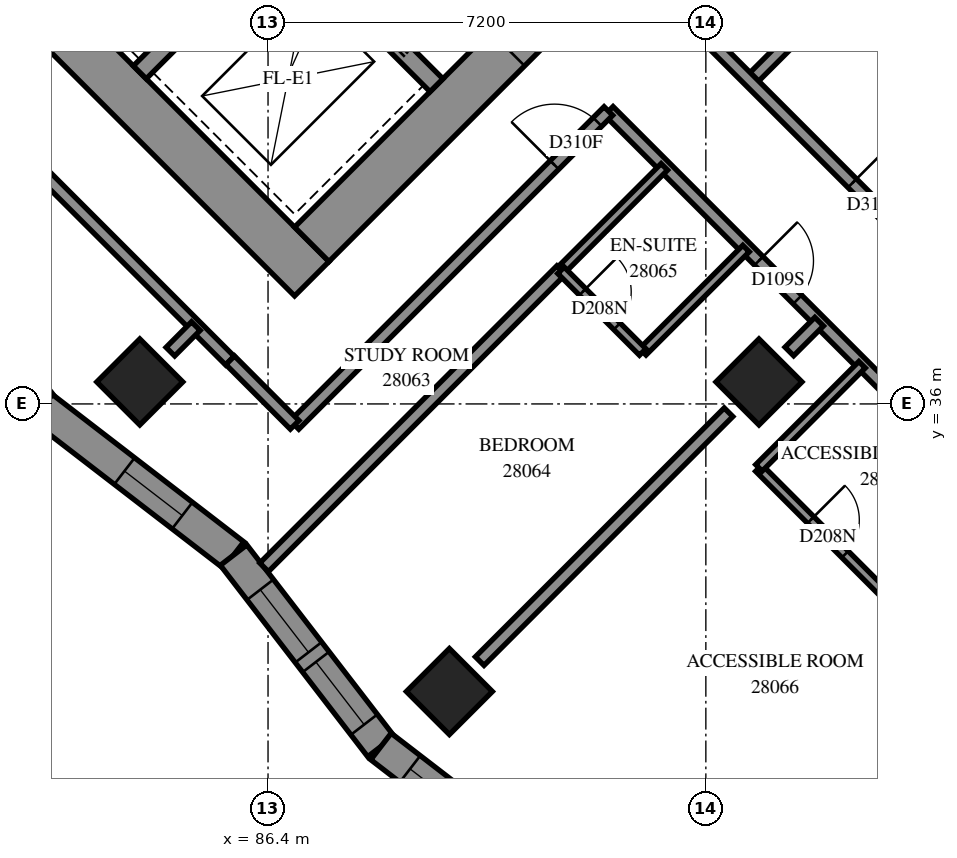
"""IFC4 building model, lengths in metres.
Left out: names, types, materials, properties, quantities, classifications, styles, units other than length and angle.
Written with IfcOpenShell. Run it as: python <this file> out.ifc"""

import sys

from ifc_helpers import new_model, si_unit, direction, frame, frame_2d, origin, origin_2d, place, context, subcontext, project, spatial, polyline, rectangle, outline, extrude, element, fill, save


model = new_model("IFC4")
c1 = context("Model", 3, precision=1e-05, world=origin(), true_north=direction((0.0, 1.0)))
c2 = subcontext(c1, "Body", "Model", "MODEL_VIEW")
j1 = project(units=[si_unit("LENGTHUNIT", "METRE"), si_unit("PLANEANGLEUNIT", "RADIAN")], contexts=[c1])
p1 = place(None, origin())
s1 = spatial("IfcSite", under=j1, at=p1, CompositionType="ELEMENT")
p2 = place(p1, origin())
s2 = spatial("IfcBuilding", under=s1, at=p2, CompositionType="ELEMENT")
p3 = place(p2, frame((0.0, 0.0, 105.0)))
s3 = spatial("IfcBuildingStorey", under=s2, at=p3, CompositionType="ELEMENT", Elevation=105.0)
for number, where, z_axis, x_axis in (
    (1, (84.291, 36.362, 0.0), (0.0, 0.0, 1.0), (0.707, -0.707, 0.0)),
    (2, (94.474, 36.362, 0.0), (0.0, 0.0, 1.0), (0.707, -0.707, 0.0)),
    (3, (89.382, 31.271, 0.0), (0.0, 0.0, 1.0), (0.707, -0.707, 0.0)),
):
    element("IfcColumn", number, at=place(p3, frame(where, z_axis=z_axis, x_axis=x_axis)), inside=s3, PredefinedType="COLUMN", context=c2, shape_type="SweptSolid", body=[
        extrude(rectangle(XDim=1.0, YDim=1.0, at=origin_2d()), origin(), (0.0, 0.0, 1.0), 3.1),
    ])
p4 = place(p3, frame((75.806, 49.373, -0.3), z_axis=(0.0, 0.0, 1.0), x_axis=(0.7071067812, -0.7071067812, 0.0)))
e4 = element("IfcWall", 4, at=p4, inside=s3, PredefinedType="SHEAR", context=c2, shape_type="SweptSolid", body=[
    extrude(rectangle(XDim=16.0, YDim=0.8, at=frame_2d((8.0, 0.0))), origin(), (0.0, 0.0, 1.0), 2.7),
])
p5 = place(p3, frame((87.12, 38.625, -0.3), z_axis=(0.0, 0.0, 1.0), x_axis=(0.7071067812, 0.7071067812, 0.0)))
e5 = element("IfcWall", 5, at=p5, inside=s3, PredefinedType="SHEAR", context=c2, shape_type="SweptSolid", body=[
    extrude(rectangle(XDim=14.4, YDim=0.8, at=frame_2d((7.2, 0.0))), origin(), (0.0, 0.0, 1.0), 2.7),
])
p6 = place(p5, frame((4.55, 0.0, 0.3)))
e6 = element("IfcOpeningElement", 6, at=p6, cuts=e5, PredefinedType="OPENING", context=c2, shape_type="SweptSolid", body=[
    extrude(rectangle(XDim=1.1, YDim=2.1, at=frame_2d((0.55, 1.05))), frame((0.0, 0.41, 0.0), z_axis=(0.0, -1.0, 0.0), x_axis=(1.0, 0.0, 0.0)), (0.0, 0.0, 1.0), 0.82),
])
p7 = place(p5, frame((11.35, 0.0, 0.3)))
e7 = element("IfcOpeningElement", 7, at=p7, cuts=e5, PredefinedType="OPENING", context=c2, shape_type="SweptSolid", body=[
    extrude(rectangle(XDim=1.1, YDim=2.1, at=frame_2d((0.55, 1.05))), frame((0.0, 0.41, 0.0), z_axis=(0.0, -1.0, 0.0), x_axis=(1.0, 0.0, 0.0)), (0.0, 0.0, 1.0), 0.82),
])
p8 = place(p3, frame((84.291, 41.453, 0.0), z_axis=(0.0, 0.0, 1.0), x_axis=(0.7071067812, 0.7071067812, 0.0)))
e8 = element("IfcWall", 8, at=p8, inside=s3, PredefinedType="SOLIDWALL", context=c2, shape_type="SweptSolid", body=[
    extrude(rectangle(XDim=3.3, YDim=0.3, at=frame_2d((1.65, 0.0))), origin(), (0.0, 0.0, 1.0), 3.1),
])
p9 = place(p3, frame((78.988, 51.423, 0.0), z_axis=(0.0, 0.0, 1.0), x_axis=(0.7071067812, -0.7071067812, 0.0)))
e9 = element("IfcWall", 9, at=p9, inside=s3, PredefinedType="SOLIDWALL", context=c2, shape_type="SweptSolid", body=[
    extrude(rectangle(XDim=14.4, YDim=0.3, at=frame_2d((7.2, 0.0))), origin(), (0.0, 0.0, 1.0), 3.1),
])
p10 = place(p9, frame((1.25, 0.0, 0.0)))
e10 = element("IfcOpeningElement", 10, at=p10, cuts=e9, PredefinedType="OPENING", context=c2, shape_type="SweptSolid", body=[
    extrude(rectangle(XDim=1.1, YDim=2.1, at=frame_2d((0.55, 1.05))), frame((0.0, 0.16, 0.0), z_axis=(0.0, -1.0, 0.0), x_axis=(1.0, 0.0, 0.0)), (0.0, 0.0, 1.0), 0.32),
])
p11 = place(p9, frame((4.85, 0.0, 0.0)))
e11 = element("IfcOpeningElement", 11, at=p11, cuts=e9, PredefinedType="OPENING", context=c2, shape_type="SweptSolid", body=[
    extrude(rectangle(XDim=1.1, YDim=2.1, at=frame_2d((0.55, 1.05))), frame((0.0, 0.16, 0.0), z_axis=(0.0, -1.0, 0.0), x_axis=(1.0, 0.0, 0.0)), (0.0, 0.0, 1.0), 0.32),
])
p12 = place(p9, frame((8.45, 0.0, 0.0)))
e12 = element("IfcOpeningElement", 12, at=p12, cuts=e9, PredefinedType="OPENING", context=c2, shape_type="SweptSolid", body=[
    extrude(rectangle(XDim=1.1, YDim=2.1, at=frame_2d((0.55, 1.05))), frame((0.0, 0.16, 0.0), z_axis=(0.0, -1.0, 0.0), x_axis=(1.0, 0.0, 0.0)), (0.0, 0.0, 1.0), 0.32),
])
p13 = place(p9, frame((12.05, 0.0, 0.0)))
e13 = element("IfcOpeningElement", 13, at=p13, cuts=e9, PredefinedType="OPENING", context=c2, shape_type="SweptSolid", body=[
    extrude(rectangle(XDim=1.1, YDim=2.1, at=frame_2d((0.55, 1.05))), frame((0.0, 0.16, 0.0), z_axis=(0.0, -1.0, 0.0), x_axis=(1.0, 0.0, 0.0)), (0.0, 0.0, 1.0), 0.32),
])
p14 = place(p3, frame((80.251, 39.101, 0.0), z_axis=(0.0, 0.0, 1.0), x_axis=(0.6100580662, -0.79235671, 0.0)))
e14 = element("IfcWall", 14, at=p14, inside=s3, PredefinedType="SOLIDWALL", context=c2, shape_type="SweptSolid", body=[
    extrude(outline(polyline([(0.056, -0.275), (4.029, -0.275), (3.957, 0.275), (-0.056, 0.275), (0.056, -0.275)])), origin(), (0.0, 0.0, 1.0), 3.1),
])
p15 = place(p14, frame((1.881, 0.0, 0.5)))
e15 = element("IfcOpeningElement", 15, at=p15, cuts=e14, PredefinedType="OPENING", context=c2, shape_type="SweptSolid", body=[
    extrude(rectangle(XDim=1.2, YDim=2.45, at=frame_2d((0.6, 1.225))), frame((0.0, 0.285, 0.0), z_axis=(0.0, -1.0, 0.0), x_axis=(1.0, 0.0, 0.0)), (0.0, 0.0, 1.0), 0.57),
])
p16 = place(p3, frame((82.686, 35.938, 0.0), z_axis=(0.0, 0.0, 1.0), x_axis=(0.7923534452, -0.6100623066, 0.0)))
e16 = element("IfcWall", 16, at=p16, inside=s3, PredefinedType="SOLIDWALL", context=c2, shape_type="SweptSolid", body=[
    extrude(outline(polyline([(-0.036, -0.275), (3.937, -0.275), (4.008, 0.275), (0.036, 0.275), (-0.036, -0.275)])), origin(), (0.0, 0.0, 1.0), 3.1),
])
p17 = place(p16, frame((1.707, 0.0, 0.5)))
e17 = element("IfcOpeningElement", 17, at=p17, cuts=e16, PredefinedType="OPENING", context=c2, shape_type="SweptSolid", body=[
    extrude(rectangle(XDim=1.2, YDim=2.45, at=frame_2d((0.6, 1.225))), frame((0.0, 0.285, 0.0), z_axis=(0.0, -1.0, 0.0), x_axis=(1.0, 0.0, 0.0)), (0.0, 0.0, 1.0), 0.57),
])
p18 = place(p3, frame((85.834, 33.514, 0.0), z_axis=(0.0, 0.0, 1.0), x_axis=(0.6100781116, -0.7923412761, 0.0)))
e18 = element("IfcWall", 18, at=p18, inside=s3, PredefinedType="SOLIDWALL", context=c2, shape_type="SweptSolid", body=[
    extrude(outline(polyline([(0.036, -0.275), (4.008, -0.275), (3.937, 0.275), (-0.036, 0.275), (0.036, -0.275)])), origin(), (0.0, 0.0, 1.0), 3.1),
])
p19 = place(p18, frame((0.718, 0.0, 0.5)))
e19 = element("IfcOpeningElement", 19, at=p19, cuts=e18, PredefinedType="OPENING", context=c2, shape_type="SweptSolid", body=[
    extrude(rectangle(XDim=1.3, YDim=2.45, at=frame_2d((0.65, 1.225))), frame((0.0, 0.285, 0.0), z_axis=(0.0, -1.0, 0.0), x_axis=(1.0, 0.0, 0.0)), (0.0, 0.0, 1.0), 0.57),
])
p20 = place(p18, frame((2.218, 0.0, 0.5)))
e20 = element("IfcOpeningElement", 20, at=p20, cuts=e18, PredefinedType="OPENING", context=c2, shape_type="SweptSolid", body=[
    extrude(rectangle(XDim=1.3, YDim=2.45, at=frame_2d((0.65, 1.225))), frame((0.0, 0.285, 0.0), z_axis=(0.0, -1.0, 0.0), x_axis=(1.0, 0.0, 0.0)), (0.0, 0.0, 1.0), 0.57),
])
p21 = place(p3, frame((88.257, 30.367, 0.0), z_axis=(0.0, 0.0, 1.0), x_axis=(0.7923412761, -0.6100781116, 0.0)))
e21 = element("IfcWall", 21, at=p21, inside=s3, PredefinedType="SOLIDWALL", context=c2, shape_type="SweptSolid", body=[
    extrude(outline(polyline([(-0.036, -0.275), (3.937, -0.275), (4.008, 0.275), (0.036, 0.275), (-0.036, -0.275)])), origin(), (0.0, 0.0, 1.0), 3.1),
])
p22 = place(p21, frame((0.604, 0.0, 0.5)))
e22 = element("IfcOpeningElement", 22, at=p22, cuts=e21, PredefinedType="OPENING", context=c2, shape_type="SweptSolid", body=[
    extrude(rectangle(XDim=1.3, YDim=2.45, at=frame_2d((0.65, 1.225))), frame((0.0, 0.285, 0.0), z_axis=(0.0, -1.0, 0.0), x_axis=(1.0, 0.0, 0.0)), (0.0, 0.0, 1.0), 0.57),
])
p23 = place(p21, frame((2.104, 0.0, 0.5)))
e23 = element("IfcOpeningElement", 23, at=p23, cuts=e21, PredefinedType="OPENING", context=c2, shape_type="SweptSolid", body=[
    extrude(rectangle(XDim=1.3, YDim=2.45, at=frame_2d((0.65, 1.225))), frame((0.0, 0.285, 0.0), z_axis=(0.0, -1.0, 0.0), x_axis=(1.0, 0.0, 0.0)), (0.0, 0.0, 1.0), 0.57),
])
p24 = place(p3, frame((92.004, 40.819, 0.0), z_axis=(0.0, 0.0, 1.0), x_axis=(0.7071067812, -0.7071067812, 0.0)))
e24 = element("IfcWall", 24, at=p24, inside=s3, PredefinedType="PARTITIONING", context=c2, shape_type="SweptSolid", body=[
    extrude(rectangle(XDim=19.298, YDim=0.2, at=frame_2d((9.649, 0.0))), origin(), (0.0, 0.0, 1.0), 3.1),
])
p25 = place(p24, frame((3.489, 0.0, 0.0)))
e25 = element("IfcOpeningElement", 25, at=p25, cuts=e24, PredefinedType="OPENING", context=c2, shape_type="SweptSolid", body=[
    extrude(rectangle(XDim=0.9, YDim=2.1, at=frame_2d((0.45, 1.05))), frame((0.0, 0.11, 0.0), z_axis=(0.0, -1.0, 0.0), x_axis=(1.0, 0.0, 0.0)), (0.0, 0.0, 1.0), 0.22),
])
p26 = place(p24, frame((9.319, 0.0, 0.0)))
e26 = element("IfcOpeningElement", 26, at=p26, cuts=e24, PredefinedType="OPENING", context=c2, shape_type="SweptSolid", body=[
    extrude(rectangle(XDim=0.9, YDim=2.1, at=frame_2d((0.45, 1.05))), frame((0.0, 0.11, 0.0), z_axis=(0.0, -1.0, 0.0), x_axis=(1.0, 0.0, 0.0)), (0.0, 0.0, 1.0), 0.22),
])
p27 = place(p24, frame((15.961, 0.0, 0.0)))
e27 = element("IfcOpeningElement", 27, at=p27, cuts=e24, PredefinedType="OPENING", context=c2, shape_type="SweptSolid", body=[
    extrude(rectangle(XDim=0.9, YDim=2.1, at=frame_2d((0.45, 1.05))), frame((0.0, 0.11, 0.0), z_axis=(0.0, -1.0, 0.0), x_axis=(1.0, 0.0, 0.0)), (0.0, 0.0, 1.0), 0.22),
])
p28 = place(p3, frame((94.331, 41.313, 0.0), z_axis=(0.0, 0.0, 1.0), x_axis=(0.7071109333, 0.7071026291, 0.0)))
e28 = element("IfcWall", 28, at=p28, inside=s3, PredefinedType="PARTITIONING", context=c2, shape_type="SweptSolid", body=[
    extrude(rectangle(XDim=12.042, YDim=0.2, at=frame_2d((6.021, 0.0))), origin(), (0.0, 0.0, 1.0), 3.1),
])
p29 = place(p3, frame((93.411, 42.227, 0.0), z_axis=(0.0, 0.0, 1.0), x_axis=(0.7071067812, -0.7071067812, 0.0)))
e29 = element("IfcWall", 29, at=p29, inside=s3, PredefinedType="PARTITIONING", context=c2, shape_type="SweptSolid", body=[
    extrude(rectangle(XDim=8.499, YDim=0.2, at=frame_2d((4.25, 0.0))), origin(), (0.0, 0.0, 1.0), 3.1),
])
p30 = place(p29, frame((3.672, 0.0, 0.0)))
e30 = element("IfcOpeningElement", 30, at=p30, cuts=e29, PredefinedType="OPENING", context=c2, shape_type="SweptSolid", body=[
    extrude(rectangle(XDim=1.0, YDim=2.1, at=frame_2d((0.5, 1.05))), frame((0.0, 0.11, 0.0), z_axis=(0.0, -1.0, 0.0), x_axis=(1.0, 0.0, 0.0)), (0.0, 0.0, 1.0), 0.22),
])
p31 = place(p3, frame((86.835, 35.655, 0.0), z_axis=(0.0, 0.0, 1.0), x_axis=(0.7071067812, 0.7071067812, 0.0)))
e31 = element("IfcWall", 31, at=p31, inside=s3, PredefinedType="PARTITIONING", context=c2, shape_type="SweptSolid", body=[
    extrude(rectangle(XDim=7.3, YDim=0.2, at=frame_2d((3.65, 0.0))), origin(), (0.0, 0.0, 1.0), 3.1),
])
p32 = place(p31, frame((6.046, 0.0, 0.0)))
e32 = element("IfcOpeningElement", 32, at=p32, cuts=e31, PredefinedType="OPENING", context=c2, shape_type="SweptSolid", body=[
    extrude(rectangle(XDim=1.0, YDim=2.1, at=frame_2d((0.5, 1.05))), frame((0.0, 0.11, 0.0), z_axis=(0.0, -1.0, 0.0), x_axis=(1.0, 0.0, 0.0)), (0.0, 0.0, 1.0), 0.22),
])
p33 = place(p3, frame((86.336, 33.313, 0.0), z_axis=(0.0, 0.0, 1.0), x_axis=(0.7069620306, 0.7072515022, 0.0)))
e33 = element("IfcWall", 33, at=p33, inside=s3, PredefinedType="PARTITIONING", context=c2, shape_type="SweptSolid", body=[
    extrude(rectangle(XDim=6.909, YDim=0.2, at=frame_2d((3.454, 0.0))), origin(), (0.0, 0.0, 1.0), 3.1),
])
p34 = place(p3, frame((80.948, 41.536, 0.0), z_axis=(0.0, 0.0, 1.0), x_axis=(0.7071067812, -0.7071067812, 0.0)))
e34 = element("IfcWall", 34, at=p34, inside=s3, PredefinedType="PARTITIONING", context=c2, shape_type="SweptSolid", body=[
    extrude(rectangle(XDim=6.822, YDim=0.2, at=frame_2d((3.411, 0.0))), origin(), (0.0, 0.0, 1.0), 3.1),
])
p35 = place(p3, frame((89.881, 31.771, 0.0), z_axis=(0.0, 0.0, 1.0), x_axis=(0.7071067812, 0.7071067812, 0.0)))
e35 = element("IfcWall", 35, at=p35, inside=s3, PredefinedType="PARTITIONING", context=c2, shape_type="SweptSolid", body=[
    extrude(rectangle(XDim=5.787, YDim=0.2, at=frame_2d((2.893, 0.0))), origin(), (0.0, 0.0, 1.0), 3.1),
])
p36 = place(p3, frame((94.973, 26.681, 0.0), z_axis=(0.0, 0.0, 1.0), x_axis=(0.7071067812, 0.7071067812, 0.0)))
e36 = element("IfcWall", 36, at=p36, inside=s3, PredefinedType="PARTITIONING", context=c2, shape_type="SweptSolid", body=[
    extrude(rectangle(XDim=5.784, YDim=0.2, at=frame_2d((2.892, 0.0))), origin(), (0.0, 0.0, 1.0), 3.1),
])
p37 = place(p3, frame((94.471, 34.945, 0.0), z_axis=(0.0, 0.0, 1.0), x_axis=(0.7067942478, -0.7074191764, 0.0)))
e37 = element("IfcWall", 37, at=p37, inside=s3, PredefinedType="PARTITIONING", context=c2, shape_type="SweptSolid", body=[
    extrude(rectangle(XDim=3.2, YDim=0.15, at=frame_2d((1.6, 0.0))), origin(), (0.0, 0.0, 1.0), 3.1),
])
p38 = place(p37, frame((1.206, 0.0, 0.0)))
e38 = element("IfcOpeningElement", 38, at=p38, cuts=e37, PredefinedType="OPENING", context=c2, shape_type="SweptSolid", body=[
    extrude(rectangle(XDim=0.8, YDim=2.1, at=frame_2d((0.4, 1.05))), frame((0.0, 0.085, 0.0), z_axis=(0.0, -1.0, 0.0), x_axis=(1.0, 0.0, 0.0)), (0.0, 0.0, 1.0), 0.17),
])
for number, where, z_axis, x_axis in (
    (39, (92.563, 36.857, 0.0), (0.0, 0.0, 1.0), (0.707, 0.707, 0.0)),
    (40, (91.219, 38.201, 0.0), (0.0, 0.0, 1.0), (0.707, 0.707, 0.0)),
):
    element("IfcWall", number, at=place(p3, frame(where, z_axis=z_axis, x_axis=x_axis)), inside=s3, PredefinedType="PARTITIONING", context=c2, shape_type="SweptSolid", body=[
        extrude(rectangle(XDim=2.401, YDim=0.15, at=frame_2d((1.201, 0.0))), origin(), (0.0, 0.0, 1.0), 3.1),
    ])
p39 = place(p3, frame((94.473, 34.949, 0.0), z_axis=(0.0, 0.0, 1.0), x_axis=(0.7071067812, 0.7071067812, 0.0)))
e41 = element("IfcWall", 41, at=p39, inside=s3, PredefinedType="PARTITIONING", context=c2, shape_type="SweptSolid", body=[
    extrude(rectangle(XDim=2.398, YDim=0.15, at=frame_2d((1.199, 0.0))), origin(), (0.0, 0.0, 1.0), 3.1),
])
p40 = place(p3, frame((91.217, 38.197, 0.0), z_axis=(0.0, 0.0, 1.0), x_axis=(0.7071067812, -0.7071067812, 0.0)))
e42 = element("IfcWall", 42, at=p40, inside=s3, PredefinedType="PARTITIONING", context=c2, shape_type="SweptSolid", body=[
    extrude(rectangle(XDim=1.901, YDim=0.15, at=frame_2d((0.95, 0.0))), origin(), (0.0, 0.0, 1.0), 3.1),
])
p41 = place(p40, frame((0.502, 0.0, 0.0)))
e43 = element("IfcOpeningElement", 43, at=p41, cuts=e42, PredefinedType="OPENING", context=c2, shape_type="SweptSolid", body=[
    extrude(rectangle(XDim=0.8, YDim=2.1, at=frame_2d((0.4, 1.05))), frame((0.0, 0.085, 0.0), z_axis=(0.0, -1.0, 0.0), x_axis=(1.0, 0.0, 0.0)), (0.0, 0.0, 1.0), 0.17),
])
p42 = place(p3, frame((85.778, 36.718, 0.0), z_axis=(0.0, 0.0, 1.0), x_axis=(0.7064400143, -0.70777292, 0.0)))
e44 = element("IfcWall", 44, at=p42, inside=s3, PredefinedType="PARTITIONING", context=c2, shape_type="SweptSolid", body=[
    extrude(rectangle(XDim=1.5, YDim=0.2, at=frame_2d((0.75, 0.0))), origin(), (0.0, 0.0, 1.0), 3.1),
])
p43 = place(p3, frame((94.973, 36.863, 0.0), z_axis=(0.0, 0.0, 1.0), x_axis=(0.7071067812, 0.7071067812, 0.0)))
e45 = element("IfcWall", 45, at=p43, inside=s3, PredefinedType="PARTITIONING", context=c2, shape_type="SweptSolid", body=[
    extrude(rectangle(XDim=0.693, YDim=0.2, at=frame_2d((0.346, 0.0))), origin(), (0.0, 0.0, 1.0), 3.1),
])
p44 = place(p3, frame((84.794, 36.86, 0.0), z_axis=(0.0, 0.0, 1.0), x_axis=(0.7054171665, 0.7087923682, 0.0)))
e46 = element("IfcWall", 46, at=p44, inside=s3, PredefinedType="PARTITIONING", context=c2, shape_type="SweptSolid", body=[
    extrude(rectangle(XDim=0.593, YDim=0.2, at=frame_2d((0.296, 0.0))), origin(), (0.0, 0.0, 1.0), 3.1),
])
p45 = place(p17, origin())
e47 = element("IfcWindow", 47, at=p45, inside=s3, PartitioningType="SINGLE_PANEL", PredefinedType="WINDOW", context=c2, shape_type="SweptSolid", body=[
    extrude(rectangle(XDim=1.2, YDim=2.45, at=frame_2d((0.6, 1.225))), frame((0.0, 0.155, 0.0), z_axis=(0.0, -1.0, 0.0), x_axis=(1.0, 0.0, 0.0)), (0.0, 0.0, 1.0), 0.06),
])
fill(e17, e47)
p46 = place(p19, origin())
e48 = element("IfcWindow", 48, at=p46, inside=s3, PartitioningType="SINGLE_PANEL", PredefinedType="WINDOW", context=c2, shape_type="SweptSolid", body=[
    extrude(rectangle(XDim=1.3, YDim=2.45, at=frame_2d((0.65, 1.225))), frame((0.0, 0.155, 0.0), z_axis=(0.0, -1.0, 0.0), x_axis=(1.0, 0.0, 0.0)), (0.0, 0.0, 1.0), 0.06),
])
fill(e19, e48)
p47 = place(p20, origin())
e49 = element("IfcWindow", 49, at=p47, inside=s3, PartitioningType="SINGLE_PANEL", PredefinedType="WINDOW", context=c2, shape_type="SweptSolid", body=[
    extrude(rectangle(XDim=1.3, YDim=2.45, at=frame_2d((0.65, 1.225))), frame((0.0, 0.155, 0.0), z_axis=(0.0, -1.0, 0.0), x_axis=(1.0, 0.0, 0.0)), (0.0, 0.0, 1.0), 0.06),
])
fill(e20, e49)
p48 = place(p22, origin())
e50 = element("IfcWindow", 50, at=p48, inside=s3, PartitioningType="SINGLE_PANEL", PredefinedType="WINDOW", context=c2, shape_type="SweptSolid", body=[
    extrude(rectangle(XDim=1.3, YDim=2.45, at=frame_2d((0.65, 1.225))), frame((0.0, 0.155, 0.0), z_axis=(0.0, -1.0, 0.0), x_axis=(1.0, 0.0, 0.0)), (0.0, 0.0, 1.0), 0.06),
])
fill(e22, e50)
p49 = place(p30, origin())
e51 = element("IfcDoor", 51, at=p49, inside=s3, OperationType="SINGLE_SWING_RIGHT", PredefinedType="DOOR", context=c2, shape_type="SweptSolid", body=[
    extrude(rectangle(XDim=1.0, YDim=2.1, at=frame_2d((0.5, 1.05))), frame((0.0, 0.025, 0.0), z_axis=(0.0, -1.0, 0.0), x_axis=(1.0, 0.0, 0.0)), (0.0, 0.0, 1.0), 0.05),
])
fill(e30, e51)
p50 = place(p32, origin())
e52 = element("IfcDoor", 52, at=p50, inside=s3, OperationType="SINGLE_SWING_RIGHT", PredefinedType="DOOR", context=c2, shape_type="SweptSolid", body=[
    extrude(rectangle(XDim=1.0, YDim=2.1, at=frame_2d((0.5, 1.05))), frame((0.0, 0.025, 0.0), z_axis=(0.0, -1.0, 0.0), x_axis=(1.0, 0.0, 0.0)), (0.0, 0.0, 1.0), 0.05),
])
fill(e32, e52)
p51 = place(p25, origin())
e53 = element("IfcDoor", 53, at=p51, inside=s3, OperationType="SINGLE_SWING_LEFT", PredefinedType="DOOR", context=c2, shape_type="SweptSolid", body=[
    extrude(rectangle(XDim=0.9, YDim=2.1, at=frame_2d((0.45, 1.05))), frame((0.0, 0.025, 0.0), z_axis=(0.0, -1.0, 0.0), x_axis=(1.0, 0.0, 0.0)), (0.0, 0.0, 1.0), 0.05),
])
fill(e25, e53)
p52 = place(p41, origin())
e54 = element("IfcDoor", 54, at=p52, inside=s3, OperationType="SINGLE_SWING_RIGHT", PredefinedType="DOOR", context=c2, shape_type="SweptSolid", body=[
    extrude(rectangle(XDim=0.8, YDim=2.1, at=frame_2d((0.4, 1.05))), frame((0.0, 0.025, 0.0), z_axis=(0.0, -1.0, 0.0), x_axis=(1.0, 0.0, 0.0)), (0.0, 0.0, 1.0), 0.05),
])
fill(e43, e54)
p53 = place(p38, origin())
e55 = element("IfcDoor", 55, at=p53, inside=s3, OperationType="SINGLE_SWING_RIGHT", PredefinedType="DOOR", context=c2, shape_type="SweptSolid", body=[
    extrude(rectangle(XDim=0.8, YDim=2.1, at=frame_2d((0.4, 1.05))), frame((0.0, 0.025, 0.0), z_axis=(0.0, -1.0, 0.0), x_axis=(1.0, 0.0, 0.0)), (0.0, 0.0, 1.0), 0.05),
])
fill(e38, e55)
save(model, sys.argv[1])
